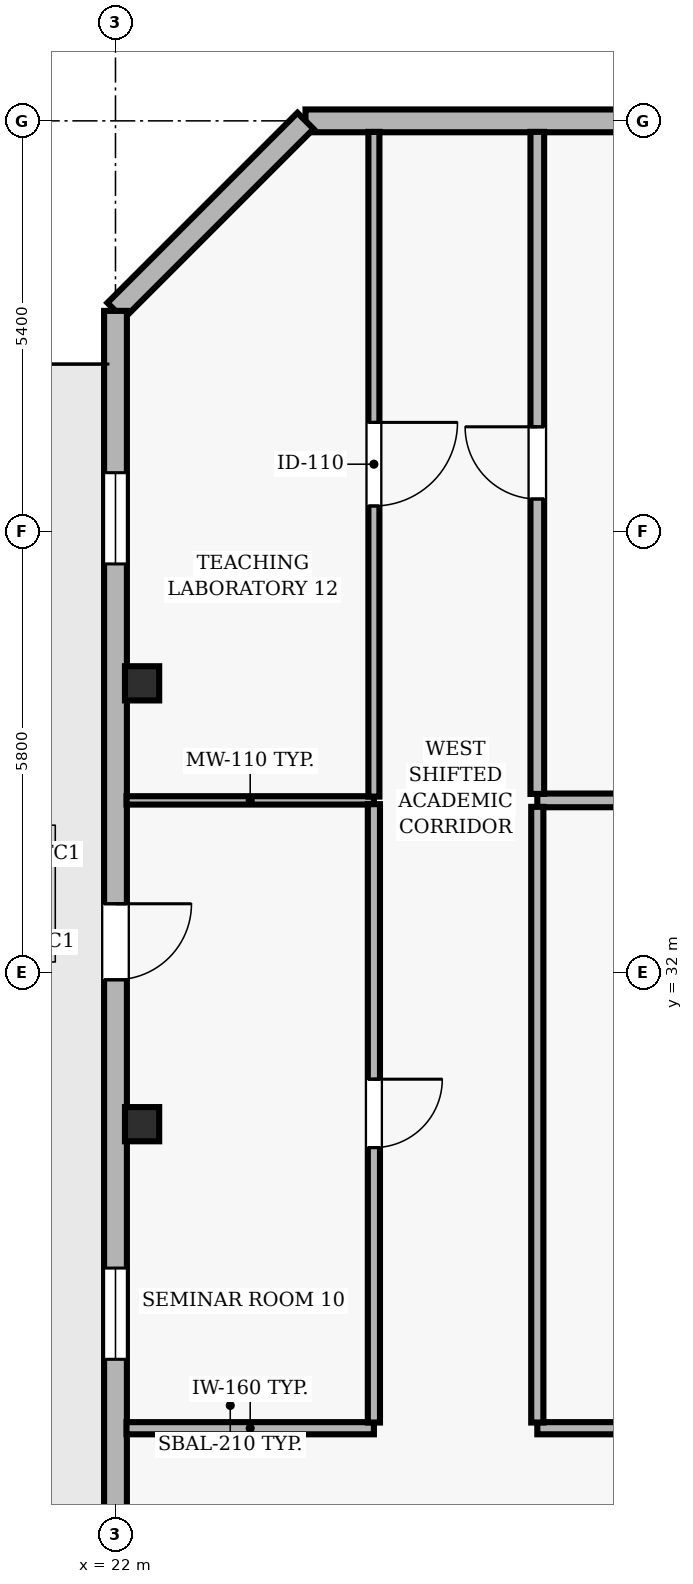
"""IFC4 building model, lengths in metres.
Left out: names, types, materials, properties, quantities, classifications, styles, units other than length and angle.
Written with IfcOpenShell. Run it as: python <this file> out.ifc"""

import sys

from ifc_helpers import new_model, si_unit, direction, frame, frame_2d, origin, origin_2d, place, context, subcontext, project, spatial, rectangle, hollow_rectangle, extrude, element, fill, save


model = new_model("IFC4")
c1 = context("Model", 3, precision=1e-05, world=origin(), true_north=direction((0.0, 1.0)))
c2 = subcontext(c1, "Body", "Model", "MODEL_VIEW")
j1 = project(units=[si_unit("LENGTHUNIT", "METRE"), si_unit("PLANEANGLEUNIT", "RADIAN")], contexts=[c1])
p1 = place(None, origin())
s1 = spatial("IfcSite", under=j1, at=p1, CompositionType="ELEMENT")
p2 = place(p1, origin())
s2 = spatial("IfcBuilding", under=s1, at=p2, CompositionType="ELEMENT")
p3 = place(p2, frame((0.0, 0.0, 199.2)))
s3 = spatial("IfcBuildingStorey", under=s2, at=p3, CompositionType="ELEMENT", Elevation=199.2)
for number, where, z_axis, x_axis in (
    (1, (22.35, 30.0, 0.0), (0.0, 0.0, 1.0), (1.0, 0.0, 0.0)),
    (2, (22.35, 35.8, 0.0), (0.0, 0.0, 1.0), (1.0, 0.0, 0.0)),
):
    element("IfcColumn", number, at=place(p3, frame(where, z_axis=z_axis, x_axis=x_axis)), inside=s3, PredefinedType="COLUMN", context=c2, shape_type="SweptSolid", body=[
        extrude(hollow_rectangle(XDim=0.45, YDim=0.45, WallThickness=0.02, at=origin_2d()), origin(), (0.0, 0.0, 1.0), 3.9),
    ])
p4 = place(p3, frame((35.5, 43.2, 0.0), z_axis=(0.0, 0.0, 1.0), x_axis=(-1.0, 0.0, 0.0)))
e3 = element("IfcWall", 3, at=p4, inside=s3, PredefinedType="SOLIDWALL", context=c2, shape_type="SweptSolid", body=[
    extrude(rectangle(XDim=11.0, YDim=0.3, at=frame_2d((5.5, 0.0))), origin(), (0.0, 0.0, 1.0), 3.69),
])
p5 = place(p4, frame((1.55, 0.0, 0.9)))
e4 = element("IfcOpeningElement", 4, at=p5, cuts=e3, PredefinedType="OPENING", context=c2, shape_type="SweptSolid", body=[
    extrude(rectangle(XDim=2.4, YDim=2.2, at=frame_2d((1.2, 1.1))), frame((0.0, 0.16, 0.0), z_axis=(0.0, -1.0, 0.0), x_axis=(1.0, 0.0, 0.0)), (0.0, 0.0, 1.0), 0.32),
])
p6 = place(p3, frame((24.5, 43.2, 0.0), z_axis=(0.0, 0.0, 1.0), x_axis=(-0.707106781187, -0.707106781187, 0.0)))
e5 = element("IfcWall", 5, at=p6, inside=s3, PredefinedType="SOLIDWALL", context=c2, shape_type="SweptSolid", body=[
    extrude(rectangle(XDim=3.536, YDim=0.3, at=frame_2d((1.768, 0.0))), origin(), (0.0, 0.0, 1.0), 3.69),
])
p7 = place(p3, frame((22.0, 40.7, 0.0), z_axis=(0.0, 0.0, 1.0), x_axis=(0.0, -1.0, 0.0)))
e6 = element("IfcWall", 6, at=p7, inside=s3, PredefinedType="SOLIDWALL", context=c2, shape_type="SweptSolid", body=[
    extrude(rectangle(XDim=38.2, YDim=0.3, at=frame_2d((19.1, 0.0))), origin(), (0.0, 0.0, 1.0), 3.69),
])
p8 = place(p7, frame((7.8, 0.0, 0.0)))
e7 = element("IfcOpeningElement", 7, at=p8, cuts=e6, PredefinedType="OPENING", context=c2, shape_type="SweptSolid", body=[
    extrude(rectangle(XDim=1.0, YDim=2.2, at=frame_2d((0.5, 1.1))), frame((0.0, 0.16, 0.0), z_axis=(0.0, -1.0, 0.0), x_axis=(1.0, 0.0, 0.0)), (0.0, 0.0, 1.0), 0.32),
])
p9 = place(p7, frame((2.129, 0.0, 0.9)))
e8 = element("IfcOpeningElement", 8, at=p9, cuts=e6, PredefinedType="OPENING", context=c2, shape_type="SweptSolid", body=[
    extrude(rectangle(XDim=1.2, YDim=1.6, at=frame_2d((0.6, 0.8))), frame((0.0, 0.16, 0.0), z_axis=(0.0, -1.0, 0.0), x_axis=(1.0, 0.0, 0.0)), (0.0, 0.0, 1.0), 0.32),
])
p10 = place(p7, frame((12.593, 0.0, 0.9)))
e9 = element("IfcOpeningElement", 9, at=p10, cuts=e6, PredefinedType="OPENING", context=c2, shape_type="SweptSolid", body=[
    extrude(rectangle(XDim=1.2, YDim=1.6, at=frame_2d((0.6, 0.8))), frame((0.0, 0.16, 0.0), z_axis=(0.0, -1.0, 0.0), x_axis=(1.0, 0.0, 0.0)), (0.0, 0.0, 1.0), 0.32),
])
p11 = place(p7, frame((18.5, 0.0, 0.9)))
e10 = element("IfcOpeningElement", 10, at=p11, cuts=e6, PredefinedType="OPENING", context=c2, shape_type="SweptSolid", body=[
    extrude(rectangle(XDim=1.2, YDim=1.6, at=frame_2d((0.6, 0.8))), frame((0.0, 0.16, 0.0), z_axis=(0.0, -1.0, 0.0), x_axis=(1.0, 0.0, 0.0)), (0.0, 0.0, 1.0), 0.32),
])
p12 = place(p7, frame((23.957, 0.0, 0.9)))
e11 = element("IfcOpeningElement", 11, at=p12, cuts=e6, PredefinedType="OPENING", context=c2, shape_type="SweptSolid", body=[
    extrude(rectangle(XDim=1.2, YDim=1.6, at=frame_2d((0.6, 0.8))), frame((0.0, 0.16, 0.0), z_axis=(0.0, -1.0, 0.0), x_axis=(1.0, 0.0, 0.0)), (0.0, 0.0, 1.0), 0.32),
])
p13 = place(p7, frame((29.414, 0.0, 0.9)))
e12 = element("IfcOpeningElement", 12, at=p13, cuts=e6, PredefinedType="OPENING", context=c2, shape_type="SweptSolid", body=[
    extrude(rectangle(XDim=1.2, YDim=1.6, at=frame_2d((0.6, 0.8))), frame((0.0, 0.16, 0.0), z_axis=(0.0, -1.0, 0.0), x_axis=(1.0, 0.0, 0.0)), (0.0, 0.0, 1.0), 0.32),
])
p14 = place(p3, frame((25.4, 26.0, 0.0), z_axis=(0.0, 0.0, 1.0), x_axis=(-1.0, 0.0, 0.0)))
e13 = element("IfcWall", 13, at=p14, inside=s3, PredefinedType="PARTITIONING", context=c2, shape_type="SweptSolid", body=[
    extrude(rectangle(XDim=3.255, YDim=0.16, at=frame_2d((1.627, 0.0))), origin(), (0.0, 0.0, 1.0), 3.69),
])
p15 = place(p3, frame((25.4, 34.26, 0.0), z_axis=(0.0, 0.0, 1.0), x_axis=(-1.0, 0.0, 0.0)))
e14 = element("IfcWall", 14, at=p15, inside=s3, PredefinedType="MOVABLE", context=c2, shape_type="SweptSolid", body=[
    extrude(rectangle(XDim=3.255, YDim=0.11, at=frame_2d((1.627, 0.0))), origin(), (0.0, 0.0, 1.0), 3.69),
])
p16 = place(p3, frame((37.85, 26.0, 0.0), z_axis=(0.0, 0.0, 1.0), x_axis=(-1.0, 0.0, 0.0)))
e15 = element("IfcWall", 15, at=p16, inside=s3, PredefinedType="PARTITIONING", context=c2, shape_type="SweptSolid", body=[
    extrude(rectangle(XDim=10.3, YDim=0.16, at=frame_2d((5.15, 0.0))), origin(), (0.0, 0.0, 1.0), 3.69),
])
p17 = place(p16, frame((4.7, 0.0, 0.0)))
e16 = element("IfcOpeningElement", 16, at=p17, cuts=e15, PredefinedType="OPENING", context=c2, shape_type="SweptSolid", body=[
    extrude(rectangle(XDim=0.9, YDim=2.1, at=frame_2d((0.45, 1.05))), frame((0.0, 0.09, 0.0), z_axis=(0.0, -1.0, 0.0), x_axis=(1.0, 0.0, 0.0)), (0.0, 0.0, 1.0), 0.18),
])
p18 = place(p3, frame((37.85, 34.26, 0.0), z_axis=(0.0, 0.0, 1.0), x_axis=(-1.0, 0.0, 0.0)))
e17 = element("IfcWall", 17, at=p18, inside=s3, PredefinedType="PARTITIONING", context=c2, shape_type="SweptSolid", body=[
    extrude(rectangle(XDim=10.3, YDim=0.18, at=frame_2d((5.15, 0.0))), origin(), (0.0, 0.0, 1.0), 3.69),
])
p19 = place(p3, frame((25.4, 34.21, 0.0), z_axis=(0.0, 0.0, 1.0), x_axis=(0.0, -1.0, 0.0)))
e18 = element("IfcWall", 18, at=p19, inside=s3, PredefinedType="PARTITIONING", context=c2, shape_type="SweptSolid", body=[
    extrude(rectangle(XDim=8.135, YDim=0.16, at=frame_2d((4.067, 0.0))), origin(), (0.0, 0.0, 1.0), 3.69),
])
p20 = place(p19, frame((3.618, 0.0, 0.0)))
e19 = element("IfcOpeningElement", 19, at=p20, cuts=e18, PredefinedType="OPENING", context=c2, shape_type="SweptSolid", body=[
    extrude(rectangle(XDim=0.9, YDim=2.1, at=frame_2d((0.45, 1.05))), frame((0.0, 0.09, 0.0), z_axis=(0.0, -1.0, 0.0), x_axis=(1.0, 0.0, 0.0)), (0.0, 0.0, 1.0), 0.18),
])
p21 = place(p3, frame((25.4, 43.055, 0.0), z_axis=(0.0, 0.0, 1.0), x_axis=(0.0, -1.0, 0.0)))
e20 = element("IfcWall", 20, at=p21, inside=s3, PredefinedType="PARTITIONING", context=c2, shape_type="SweptSolid", body=[
    extrude(rectangle(XDim=8.745, YDim=0.145, at=frame_2d((4.373, 0.0))), origin(), (0.0, 0.0, 1.0), 3.69),
])
p22 = place(p21, frame((3.822, 0.0, 0.0)))
e21 = element("IfcOpeningElement", 21, at=p22, cuts=e20, PredefinedType="OPENING", context=c2, shape_type="SweptSolid", body=[
    extrude(rectangle(XDim=1.1, YDim=2.15, at=frame_2d((0.55, 1.075))), frame((0.0, 0.083, 0.0), z_axis=(0.0, -1.0, 0.0), x_axis=(1.0, 0.0, 0.0)), (0.0, 0.0, 1.0), 0.165),
])
p23 = place(p3, frame((27.55, 26.075, 0.0), z_axis=(0.0, 0.0, 1.0), x_axis=(0.0, 1.0, 0.0)))
e22 = element("IfcWall", 22, at=p23, inside=s3, PredefinedType="PARTITIONING", context=c2, shape_type="SweptSolid", body=[
    extrude(rectangle(XDim=8.1, YDim=0.16, at=frame_2d((4.05, 0.0))), origin(), (0.0, 0.0, 1.0), 3.69),
])
p24 = place(p3, frame((27.55, 34.345, 0.0), z_axis=(0.0, 0.0, 1.0), x_axis=(0.0, 1.0, 0.0)))
e23 = element("IfcWall", 23, at=p24, inside=s3, PredefinedType="PARTITIONING", context=c2, shape_type="SweptSolid", body=[
    extrude(rectangle(XDim=8.71, YDim=0.18, at=frame_2d((4.355, 0.0))), origin(), (0.0, 0.0, 1.0), 3.69),
])
p25 = place(p24, frame((3.88, 0.0, 0.0)))
e24 = element("IfcOpeningElement", 24, at=p25, cuts=e23, PredefinedType="OPENING", context=c2, shape_type="SweptSolid", body=[
    extrude(rectangle(XDim=0.95, YDim=2.1, at=frame_2d((0.475, 1.05))), frame((0.0, 0.1, 0.0), z_axis=(0.0, -1.0, 0.0), x_axis=(1.0, 0.0, 0.0)), (0.0, 0.0, 1.0), 0.2),
])
p26 = place(p8, origin())
e25 = element("IfcDoor", 25, at=p26, inside=s3, OperationType="SINGLE_SWING_LEFT", PredefinedType="DOOR", context=c2, shape_type="SweptSolid", body=[
    extrude(rectangle(XDim=1.0, YDim=2.2, at=frame_2d((0.5, 1.1))), frame((0.0, 0.025, 0.0), z_axis=(0.0, -1.0, 0.0), x_axis=(1.0, 0.0, 0.0)), (0.0, 0.0, 1.0), 0.05),
])
fill(e7, e25)
p27 = place(p9, origin())
e26 = element("IfcWindow", 26, at=p27, inside=s3, PartitioningType="SINGLE_PANEL", PredefinedType="WINDOW", context=c2, shape_type="SweptSolid", body=[
    extrude(rectangle(XDim=1.2, YDim=1.6, at=frame_2d((0.6, 0.8))), frame((0.0, 0.03, 0.0), z_axis=(0.0, -1.0, 0.0), x_axis=(1.0, 0.0, 0.0)), (0.0, 0.0, 1.0), 0.06),
])
fill(e8, e26)
p28 = place(p10, origin())
e27 = element("IfcWindow", 27, at=p28, inside=s3, PartitioningType="SINGLE_PANEL", PredefinedType="WINDOW", context=c2, shape_type="SweptSolid", body=[
    extrude(rectangle(XDim=1.2, YDim=1.6, at=frame_2d((0.6, 0.8))), frame((0.0, 0.03, 0.0), z_axis=(0.0, -1.0, 0.0), x_axis=(1.0, 0.0, 0.0)), (0.0, 0.0, 1.0), 0.06),
])
fill(e9, e27)
p29 = place(p20, origin())
e28 = element("IfcDoor", 28, at=p29, inside=s3, OperationType="SINGLE_SWING_LEFT", PredefinedType="DOOR", context=c2, shape_type="SweptSolid", body=[
    extrude(rectangle(XDim=0.9, YDim=2.1, at=frame_2d((0.45, 1.05))), frame((0.0, 0.025, 0.0), z_axis=(0.0, -1.0, 0.0), x_axis=(1.0, 0.0, 0.0)), (0.0, 0.0, 1.0), 0.05),
])
fill(e19, e28)
p30 = place(p22, origin())
e29 = element("IfcDoor", 29, at=p30, inside=s3, OperationType="SINGLE_SWING_LEFT", PredefinedType="DOOR", context=c2, shape_type="SweptSolid", body=[
    extrude(rectangle(XDim=1.1, YDim=2.15, at=frame_2d((0.55, 1.075))), frame((0.0, 0.025, 0.0), z_axis=(0.0, -1.0, 0.0), x_axis=(1.0, 0.0, 0.0)), (0.0, 0.0, 1.0), 0.05),
])
fill(e21, e29)
p31 = place(p25, origin())
e30 = element("IfcDoor", 30, at=p31, inside=s3, OperationType="SINGLE_SWING_RIGHT", PredefinedType="DOOR", context=c2, shape_type="SweptSolid", body=[
    extrude(rectangle(XDim=0.95, YDim=2.1, at=frame_2d((0.475, 1.05))), frame((0.0, 0.025, 0.0), z_axis=(0.0, -1.0, 0.0), x_axis=(1.0, 0.0, 0.0)), (0.0, 0.0, 1.0), 0.05),
])
fill(e24, e30)
save(model, sys.argv[1])
